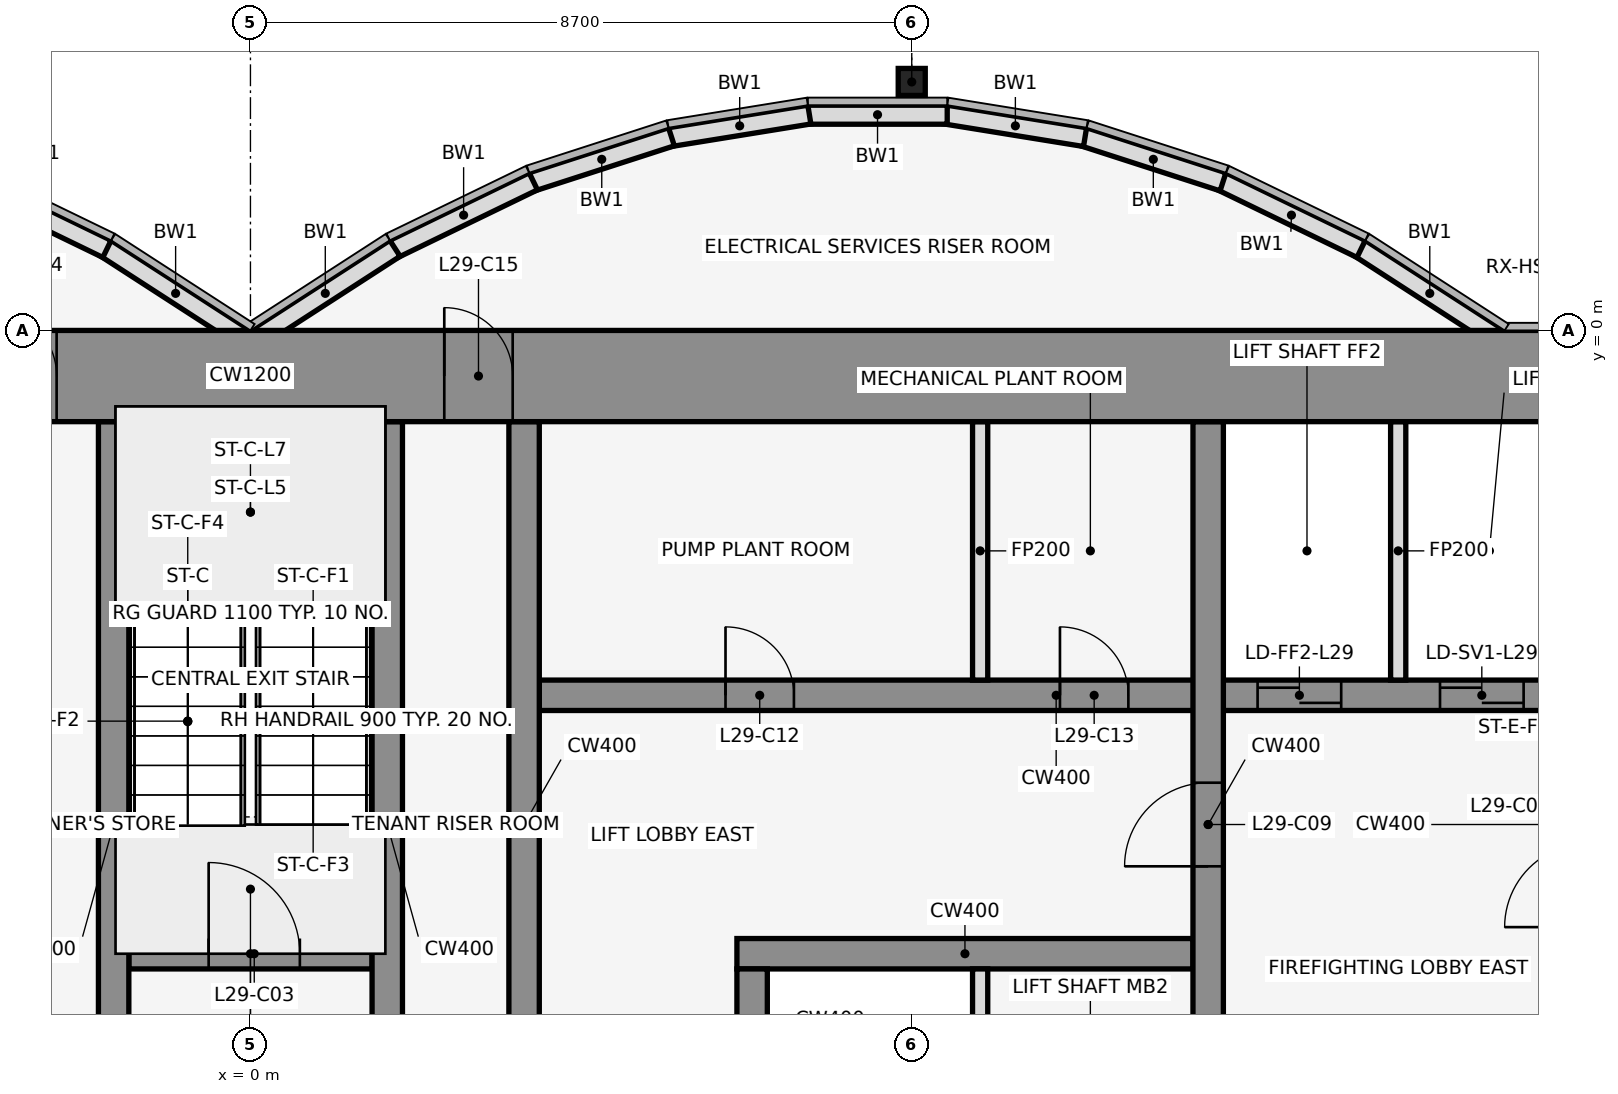
"""IFC4 building model, lengths in metres.
Left out: names, types, materials, properties, quantities, classifications, styles, units other than length and angle.
Written with IfcOpenShell. Run it as: python <this file> out.ifc"""

import sys

from ifc_helpers import new_model, si_unit, direction, frame, frame_2d, origin, origin_2d, place, context, subcontext, project, spatial, rectangle, hollow_rectangle, extrude, element, fill, save


model = new_model("IFC4")
c1 = context("Model", 3, precision=1e-05, world=origin(), true_north=direction((0.0, 1.0)))
c2 = subcontext(c1, "Body", "Model", "MODEL_VIEW")
j1 = project(units=[si_unit("LENGTHUNIT", "METRE"), si_unit("PLANEANGLEUNIT", "RADIAN")], contexts=[c1])
p1 = place(None, origin())
s1 = spatial("IfcSite", under=j1, at=p1, CompositionType="ELEMENT")
p2 = place(p1, origin())
s2 = spatial("IfcBuilding", under=s1, at=p2, CompositionType="ELEMENT")
p3 = place(p2, frame((0.0, 0.0, 135.0)))
s3 = spatial("IfcBuildingStorey", under=s2, at=p3, CompositionType="ELEMENT", Elevation=135.0)
p4 = place(p3, frame((8.7, 3.269, 0.0), z_axis=(0.0, 0.0, 1.0), x_axis=(1.0, 0.0, 0.0)))
e1 = element("IfcColumn", 1, at=p4, inside=s3, PredefinedType="COLUMN", context=c2, shape_type="SweptSolid", body=[
    extrude(hollow_rectangle(XDim=0.356, YDim=0.356, WallThickness=0.012, at=origin_2d()), origin(), (0.0, 0.0, 1.0), 5.4),
])
p5 = place(p3, frame((16.432, -0.105, 0.0), z_axis=(0.0, 0.0, 1.0), x_axis=(-0.83981312244, 0.542875602121, 0.0)))
e2 = element("IfcWall", 2, at=p5, inside=s3, PredefinedType="STANDARD", context=c2, shape_type="SweptSolid", body=[
    extrude(rectangle(XDim=2.183, YDim=0.25, at=frame_2d((1.091, 0.0))), origin(), (0.0, 0.0, 1.0), 5.25),
])
p6 = place(p3, frame((14.612, 1.073, 0.0), z_axis=(0.0, 0.0, 1.0), x_axis=(-0.89982408427, 0.436252928206, 0.0)))
e3 = element("IfcWall", 3, at=p6, inside=s3, PredefinedType="STANDARD", context=c2, shape_type="SweptSolid", body=[
    extrude(rectangle(XDim=2.038, YDim=0.25, at=frame_2d((1.019, 0.0))), origin(), (0.0, 0.0, 1.0), 5.25),
])
p7 = place(p3, frame((12.795, 1.955, 0.0), z_axis=(0.0, 0.0, 1.0), x_axis=(-0.951495806175, 0.307661714928, 0.0)))
e4 = element("IfcWall", 4, at=p7, inside=s3, PredefinedType="STANDARD", context=c2, shape_type="SweptSolid", body=[
    extrude(rectangle(XDim=1.927, YDim=0.25, at=frame_2d((0.963, 0.0))), origin(), (0.0, 0.0, 1.0), 5.25),
])
p8 = place(p3, frame((10.98, 2.543, 0.0), z_axis=(0.0, 0.0, 1.0), x_axis=(-0.987181718931, 0.159600293885, 0.0)))
e5 = element("IfcWall", 5, at=p8, inside=s3, PredefinedType="STANDARD", context=c2, shape_type="SweptSolid", body=[
    extrude(rectangle(XDim=1.857, YDim=0.25, at=frame_2d((0.929, 0.0))), origin(), (0.0, 0.0, 1.0), 5.25),
])
p9 = place(p3, frame((9.167, 2.838, 0.0), z_axis=(0.0, 0.0, 1.0), x_axis=(-1.0, 0.0, 0.0)))
e6 = element("IfcWall", 6, at=p9, inside=s3, PredefinedType="STANDARD", context=c2, shape_type="SweptSolid", body=[
    extrude(rectangle(XDim=1.833, YDim=0.25, at=frame_2d((0.917, 0.0))), origin(), (0.0, 0.0, 1.0), 5.25),
])
p10 = place(p3, frame((7.353, 2.84, 0.0), z_axis=(0.0, 0.0, 1.0), x_axis=(-0.987181718931, -0.159600293885, 0.0)))
e7 = element("IfcWall", 7, at=p10, inside=s3, PredefinedType="STANDARD", context=c2, shape_type="SweptSolid", body=[
    extrude(rectangle(XDim=1.857, YDim=0.25, at=frame_2d((0.929, 0.0))), origin(), (0.0, 0.0, 1.0), 5.25),
])
p11 = place(p3, frame((5.538, 2.548, 0.0), z_axis=(0.0, 0.0, 1.0), x_axis=(-0.951495806175, -0.307661714928, 0.0)))
e8 = element("IfcWall", 8, at=p11, inside=s3, PredefinedType="STANDARD", context=c2, shape_type="SweptSolid", body=[
    extrude(rectangle(XDim=1.927, YDim=0.25, at=frame_2d((0.963, 0.0))), origin(), (0.0, 0.0, 1.0), 5.25),
])
p12 = place(p3, frame((3.721, 1.962, 0.0), z_axis=(0.0, 0.0, 1.0), x_axis=(-0.89982408427, -0.436252928206, 0.0)))
e9 = element("IfcWall", 9, at=p12, inside=s3, PredefinedType="STANDARD", context=c2, shape_type="SweptSolid", body=[
    extrude(rectangle(XDim=2.038, YDim=0.25, at=frame_2d((1.019, 0.0))), origin(), (0.0, 0.0, 1.0), 5.25),
])
for number, where, z_axis, x_axis in (
    (10, (1.901, 1.08, 0.0), (0.0, 0.0, 1.0), (-0.84, -0.543, 0.0)),
    (11, (-0.068, -0.105, 0.0), (0.0, 0.0, 1.0), (-0.84, 0.543, 0.0)),
):
    element("IfcWall", number, at=place(p3, frame(where, z_axis=z_axis, x_axis=x_axis)), inside=s3, PredefinedType="STANDARD", context=c2, shape_type="SweptSolid", body=[
        extrude(rectangle(XDim=2.183, YDim=0.25, at=frame_2d((1.091, 0.0))), origin(), (0.0, 0.0, 1.0), 5.25),
    ])
p13 = place(p3, frame((-1.888, 1.073, 0.0), z_axis=(0.0, 0.0, 1.0), x_axis=(-0.89982408427, 0.436252928206, 0.0)))
e12 = element("IfcWall", 12, at=p13, inside=s3, PredefinedType="STANDARD", context=c2, shape_type="SweptSolid", body=[
    extrude(rectangle(XDim=2.038, YDim=0.25, at=frame_2d((1.019, 0.0))), origin(), (0.0, 0.0, 1.0), 5.25),
])
p14 = place(p3, frame((-1.6, -8.2, 0.0), z_axis=(0.0, 0.0, 1.0), x_axis=(1.0, 0.0, 0.0)))
e13 = element("IfcWall", 13, at=p14, inside=s3, PredefinedType="SHEAR", context=c2, shape_type="SweptSolid", body=[
    extrude(rectangle(XDim=3.2, YDim=0.4, at=frame_2d((1.6, 0.0))), origin(), (0.0, 0.0, 1.0), 5.4),
])
p15 = place(p14, frame((1.05, 0.0, 0.0)))
e14 = element("IfcOpeningElement", 14, at=p15, cuts=e13, PredefinedType="OPENING", context=c2, shape_type="SweptSolid", body=[
    extrude(rectangle(XDim=1.2, YDim=2.1, at=frame_2d((0.6, 1.05))), frame((0.0, 0.212, 0.0), z_axis=(0.0, -1.0, 0.0), x_axis=(1.0, 0.0, 0.0)), (0.0, 0.0, 1.0), 0.424),
])
p16 = place(p3, frame((6.4, -8.2, 0.0), z_axis=(0.0, 0.0, 1.0), x_axis=(1.0, 0.0, 0.0)))
e15 = element("IfcWall", 15, at=p16, inside=s3, PredefinedType="SHEAR", context=c2, shape_type="SweptSolid", body=[
    extrude(rectangle(XDim=6.0, YDim=0.4, at=frame_2d((3.0, 0.0))), origin(), (0.0, 0.0, 1.0), 5.4),
])
p17 = place(p3, frame((3.8, -4.8, 0.0), z_axis=(0.0, 0.0, 1.0), x_axis=(1.0, 0.0, 0.0)))
e16 = element("IfcWall", 16, at=p17, inside=s3, PredefinedType="SHEAR", context=c2, shape_type="SweptSolid", body=[
    extrude(rectangle(XDim=13.6, YDim=0.4, at=frame_2d((6.8, 0.0))), origin(), (0.0, 0.0, 1.0), 5.4),
])
p18 = place(p17, frame((9.45, 0.0, 0.0)))
e17 = element("IfcOpeningElement", 17, at=p18, cuts=e16, PredefinedType="OPENING", context=c2, shape_type="SweptSolid", body=[
    extrude(rectangle(XDim=1.1, YDim=2.1, at=frame_2d((0.55, 1.05))), frame((0.0, 0.212, 0.0), z_axis=(0.0, -1.0, 0.0), x_axis=(1.0, 0.0, 0.0)), (0.0, 0.0, 1.0), 0.424),
])
p19 = place(p17, frame((11.85, 0.0, 0.0)))
e18 = element("IfcOpeningElement", 18, at=p19, cuts=e16, PredefinedType="OPENING", context=c2, shape_type="SweptSolid", body=[
    extrude(rectangle(XDim=1.1, YDim=2.1, at=frame_2d((0.55, 1.05))), frame((0.0, 0.212, 0.0), z_axis=(0.0, -1.0, 0.0), x_axis=(1.0, 0.0, 0.0)), (0.0, 0.0, 1.0), 0.424),
])
p20 = place(p17, frame((2.45, 0.0, 0.0)))
e19 = element("IfcOpeningElement", 19, at=p20, cuts=e16, PredefinedType="OPENING", context=c2, shape_type="SweptSolid", body=[
    extrude(rectangle(XDim=0.9, YDim=2.1, at=frame_2d((0.45, 1.05))), frame((0.0, 0.212, 0.0), z_axis=(0.0, -1.0, 0.0), x_axis=(1.0, 0.0, 0.0)), (0.0, 0.0, 1.0), 0.424),
])
p21 = place(p17, frame((6.85, 0.0, 0.0)))
e20 = element("IfcOpeningElement", 20, at=p21, cuts=e16, PredefinedType="OPENING", context=c2, shape_type="SweptSolid", body=[
    extrude(rectangle(XDim=0.9, YDim=2.1, at=frame_2d((0.45, 1.05))), frame((0.0, 0.212, 0.0), z_axis=(0.0, -1.0, 0.0), x_axis=(1.0, 0.0, 0.0)), (0.0, 0.0, 1.0), 0.424),
])
for number, where, z_axis, x_axis in (
    (21, (-1.8, -11.8, 0.0), (0.0, 0.0, 1.0), (0.0, 1.0, 0.0)),
    (22, (1.8, -11.8, 0.0), (0.0, 0.0, 1.0), (0.0, 1.0, 0.0)),
):
    element("IfcWall", number, at=place(p3, frame(where, z_axis=z_axis, x_axis=x_axis)), inside=s3, PredefinedType="SHEAR", context=c2, shape_type="SweptSolid", body=[
        extrude(rectangle(XDim=10.6, YDim=0.4, at=frame_2d((5.3, 0.0))), origin(), (0.0, 0.0, 1.0), 5.4),
    ])
p22 = place(p3, frame((3.6, -11.8, 0.0), z_axis=(0.0, 0.0, 1.0), x_axis=(0.0, 1.0, 0.0)))
e23 = element("IfcWall", 23, at=p22, inside=s3, PredefinedType="SHEAR", context=c2, shape_type="SweptSolid", body=[
    extrude(rectangle(XDim=10.6, YDim=0.4, at=frame_2d((5.3, 0.0))), origin(), (0.0, 0.0, 1.0), 5.4),
])
p23 = place(p22, frame((1.35, 0.0, 0.0)))
e24 = element("IfcOpeningElement", 24, at=p23, cuts=e23, PredefinedType="OPENING", context=c2, shape_type="SweptSolid", body=[
    extrude(rectangle(XDim=0.9, YDim=2.1, at=frame_2d((0.45, 1.05))), frame((0.0, 0.212, 0.0), z_axis=(0.0, -1.0, 0.0), x_axis=(1.0, 0.0, 0.0)), (0.0, 0.0, 1.0), 0.424),
])
p24 = place(p3, frame((6.6, -11.8, 0.0), z_axis=(0.0, 0.0, 1.0), x_axis=(0.0, 1.0, 0.0)))
e25 = element("IfcWall", 25, at=p24, inside=s3, PredefinedType="SHEAR", context=c2, shape_type="SweptSolid", body=[
    extrude(rectangle(XDim=3.4, YDim=0.4, at=frame_2d((1.7, 0.0))), origin(), (0.0, 0.0, 1.0), 5.4),
])
p25 = place(p24, frame((1.15, 0.0, 0.0)))
e26 = element("IfcOpeningElement", 26, at=p25, cuts=e25, PredefinedType="OPENING", context=c2, shape_type="SweptSolid", body=[
    extrude(rectangle(XDim=1.2, YDim=2.1, at=frame_2d((0.6, 1.05))), frame((0.0, 0.212, 0.0), z_axis=(0.0, -1.0, 0.0), x_axis=(1.0, 0.0, 0.0)), (0.0, 0.0, 1.0), 0.424),
])
for number, where, z_axis, x_axis in (
    (27, (9.6, -11.8, 0.0), (0.0, 0.0, 1.0), (0.0, 1.0, 0.0)),
    (28, (9.6, -4.6, 0.0), (0.0, 0.0, 1.0), (0.0, 1.0, 0.0)),
):
    element("IfcWall", number, at=place(p3, frame(where, z_axis=z_axis, x_axis=x_axis)), inside=s3, PredefinedType="PARTITIONING", context=c2, shape_type="SweptSolid", body=[
        extrude(rectangle(XDim=3.4, YDim=0.2, at=frame_2d((1.7, 0.0))), origin(), (0.0, 0.0, 1.0), 4.24),
    ])
p26 = place(p3, frame((12.6, -11.8, 0.0), z_axis=(0.0, 0.0, 1.0), x_axis=(0.0, 1.0, 0.0)))
e29 = element("IfcWall", 29, at=p26, inside=s3, PredefinedType="SHEAR", context=c2, shape_type="SweptSolid", body=[
    extrude(rectangle(XDim=10.6, YDim=0.4, at=frame_2d((5.3, 0.0))), origin(), (0.0, 0.0, 1.0), 5.4),
])
p27 = place(p26, frame((1.25, 0.0, 0.0)))
e30 = element("IfcOpeningElement", 30, at=p27, cuts=e29, PredefinedType="OPENING", context=c2, shape_type="SweptSolid", body=[
    extrude(rectangle(XDim=1.2, YDim=2.1, at=frame_2d((0.6, 1.05))), frame((0.0, 0.212, 0.0), z_axis=(0.0, -1.0, 0.0), x_axis=(1.0, 0.0, 0.0)), (0.0, 0.0, 1.0), 0.424),
])
p28 = place(p26, frame((4.75, 0.0, 0.0)))
e31 = element("IfcOpeningElement", 31, at=p28, cuts=e29, PredefinedType="OPENING", context=c2, shape_type="SweptSolid", body=[
    extrude(rectangle(XDim=1.1, YDim=2.1, at=frame_2d((0.55, 1.05))), frame((0.0, 0.212, 0.0), z_axis=(0.0, -1.0, 0.0), x_axis=(1.0, 0.0, 0.0)), (0.0, 0.0, 1.0), 0.424),
])
p29 = place(p3, frame((15.1, -4.6, 0.0), z_axis=(0.0, 0.0, 1.0), x_axis=(0.0, 1.0, 0.0)))
e32 = element("IfcWall", 32, at=p29, inside=s3, PredefinedType="PARTITIONING", context=c2, shape_type="SweptSolid", body=[
    extrude(rectangle(XDim=3.4, YDim=0.2, at=frame_2d((1.7, 0.0))), origin(), (0.0, 0.0, 1.0), 4.24),
])
p30 = place(p3, frame((-22.0, -0.6, 0.0), z_axis=(0.0, 0.0, 1.0), x_axis=(1.0, 0.0, 0.0)))
e33 = element("IfcWall", 33, at=p30, inside=s3, PredefinedType="SHEAR", context=c2, shape_type="SweptSolid", body=[
    extrude(rectangle(XDim=44.0, YDim=1.2, at=frame_2d((22.0, 0.0))), origin(), (0.0, 0.0, 1.0), 5.4),
])
p31 = place(p30, frame((18.55, 0.0, 0.0)))
e34 = element("IfcOpeningElement", 34, at=p31, cuts=e33, PredefinedType="OPENING", context=c2, shape_type="SweptSolid", body=[
    extrude(rectangle(XDim=0.9, YDim=2.1, at=frame_2d((0.45, 1.05))), frame((0.0, 0.612, 0.0), z_axis=(0.0, -1.0, 0.0), x_axis=(1.0, 0.0, 0.0)), (0.0, 0.0, 1.0), 1.224),
])
p32 = place(p30, frame((24.55, 0.0, 0.0)))
e35 = element("IfcOpeningElement", 35, at=p32, cuts=e33, PredefinedType="OPENING", context=c2, shape_type="SweptSolid", body=[
    extrude(rectangle(XDim=0.9, YDim=2.1, at=frame_2d((0.45, 1.05))), frame((0.0, 0.612, 0.0), z_axis=(0.0, -1.0, 0.0), x_axis=(1.0, 0.0, 0.0)), (0.0, 0.0, 1.0), 1.224),
])
p33 = place(p15, origin())
e36 = element("IfcDoor", 36, at=p33, inside=s3, OperationType="SINGLE_SWING_LEFT", PredefinedType="DOOR", context=c2, shape_type="SweptSolid", body=[
    extrude(rectangle(XDim=1.2, YDim=2.1, at=frame_2d((0.6, 1.05))), frame((0.0, 0.025, 0.0), z_axis=(0.0, -1.0, 0.0), x_axis=(1.0, 0.0, 0.0)), (0.0, 0.0, 1.0), 0.05),
])
fill(e14, e36)
p34 = place(p18, origin())
e37 = element("IfcDoor", 37, at=p34, inside=s3, OperationType="DOUBLE_DOOR_SLIDING", PredefinedType="DOOR", context=c2, shape_type="SweptSolid", body=[
    extrude(rectangle(XDim=1.1, YDim=2.1, at=frame_2d((0.55, 1.05))), frame((0.0, 0.025, 0.0), z_axis=(0.0, -1.0, 0.0), x_axis=(1.0, 0.0, 0.0)), (0.0, 0.0, 1.0), 0.05),
])
fill(e17, e37)
p35 = place(p19, origin())
e38 = element("IfcDoor", 38, at=p35, inside=s3, OperationType="DOUBLE_DOOR_SLIDING", PredefinedType="DOOR", context=c2, shape_type="SweptSolid", body=[
    extrude(rectangle(XDim=1.1, YDim=2.1, at=frame_2d((0.55, 1.05))), frame((0.0, 0.025, 0.0), z_axis=(0.0, -1.0, 0.0), x_axis=(1.0, 0.0, 0.0)), (0.0, 0.0, 1.0), 0.05),
])
fill(e18, e38)
p36 = place(p28, frame((1.1, 0.0, 0.0), z_axis=(0.0, 0.0, 1.0), x_axis=(-1.0, 0.0, 0.0)))
e39 = element("IfcDoor", 39, at=p36, inside=s3, OperationType="SINGLE_SWING_RIGHT", PredefinedType="DOOR", context=c2, shape_type="SweptSolid", body=[
    extrude(rectangle(XDim=1.1, YDim=2.1, at=frame_2d((0.55, 1.05))), frame((0.0, 0.025, 0.0), z_axis=(0.0, -1.0, 0.0), x_axis=(1.0, 0.0, 0.0)), (0.0, 0.0, 1.0), 0.05),
])
fill(e31, e39)
p37 = place(p20, origin())
e40 = element("IfcDoor", 40, at=p37, inside=s3, OperationType="SINGLE_SWING_RIGHT", PredefinedType="DOOR", context=c2, shape_type="SweptSolid", body=[
    extrude(rectangle(XDim=0.9, YDim=2.1, at=frame_2d((0.45, 1.05))), frame((0.0, 0.025, 0.0), z_axis=(0.0, -1.0, 0.0), x_axis=(1.0, 0.0, 0.0)), (0.0, 0.0, 1.0), 0.05),
])
fill(e19, e40)
p38 = place(p21, origin())
e41 = element("IfcDoor", 41, at=p38, inside=s3, OperationType="SINGLE_SWING_LEFT", PredefinedType="DOOR", context=c2, shape_type="SweptSolid", body=[
    extrude(rectangle(XDim=0.9, YDim=2.1, at=frame_2d((0.45, 1.05))), frame((0.0, 0.025, 0.0), z_axis=(0.0, -1.0, 0.0), x_axis=(1.0, 0.0, 0.0)), (0.0, 0.0, 1.0), 0.05),
])
fill(e20, e41)
p39 = place(p31, origin())
e42 = element("IfcDoor", 42, at=p39, inside=s3, OperationType="SINGLE_SWING_LEFT", PredefinedType="DOOR", context=c2, shape_type="SweptSolid", body=[
    extrude(rectangle(XDim=0.9, YDim=2.1, at=frame_2d((0.45, 1.05))), frame((0.0, 0.025, 0.0), z_axis=(0.0, -1.0, 0.0), x_axis=(1.0, 0.0, 0.0)), (0.0, 0.0, 1.0), 0.05),
])
fill(e34, e42)
p40 = place(p32, origin())
e43 = element("IfcDoor", 43, at=p40, inside=s3, OperationType="SINGLE_SWING_LEFT", PredefinedType="DOOR", context=c2, shape_type="SweptSolid", body=[
    extrude(rectangle(XDim=0.9, YDim=2.1, at=frame_2d((0.45, 1.05))), frame((0.0, 0.025, 0.0), z_axis=(0.0, -1.0, 0.0), x_axis=(1.0, 0.0, 0.0)), (0.0, 0.0, 1.0), 0.05),
])
fill(e35, e43)
save(model, sys.argv[1])
